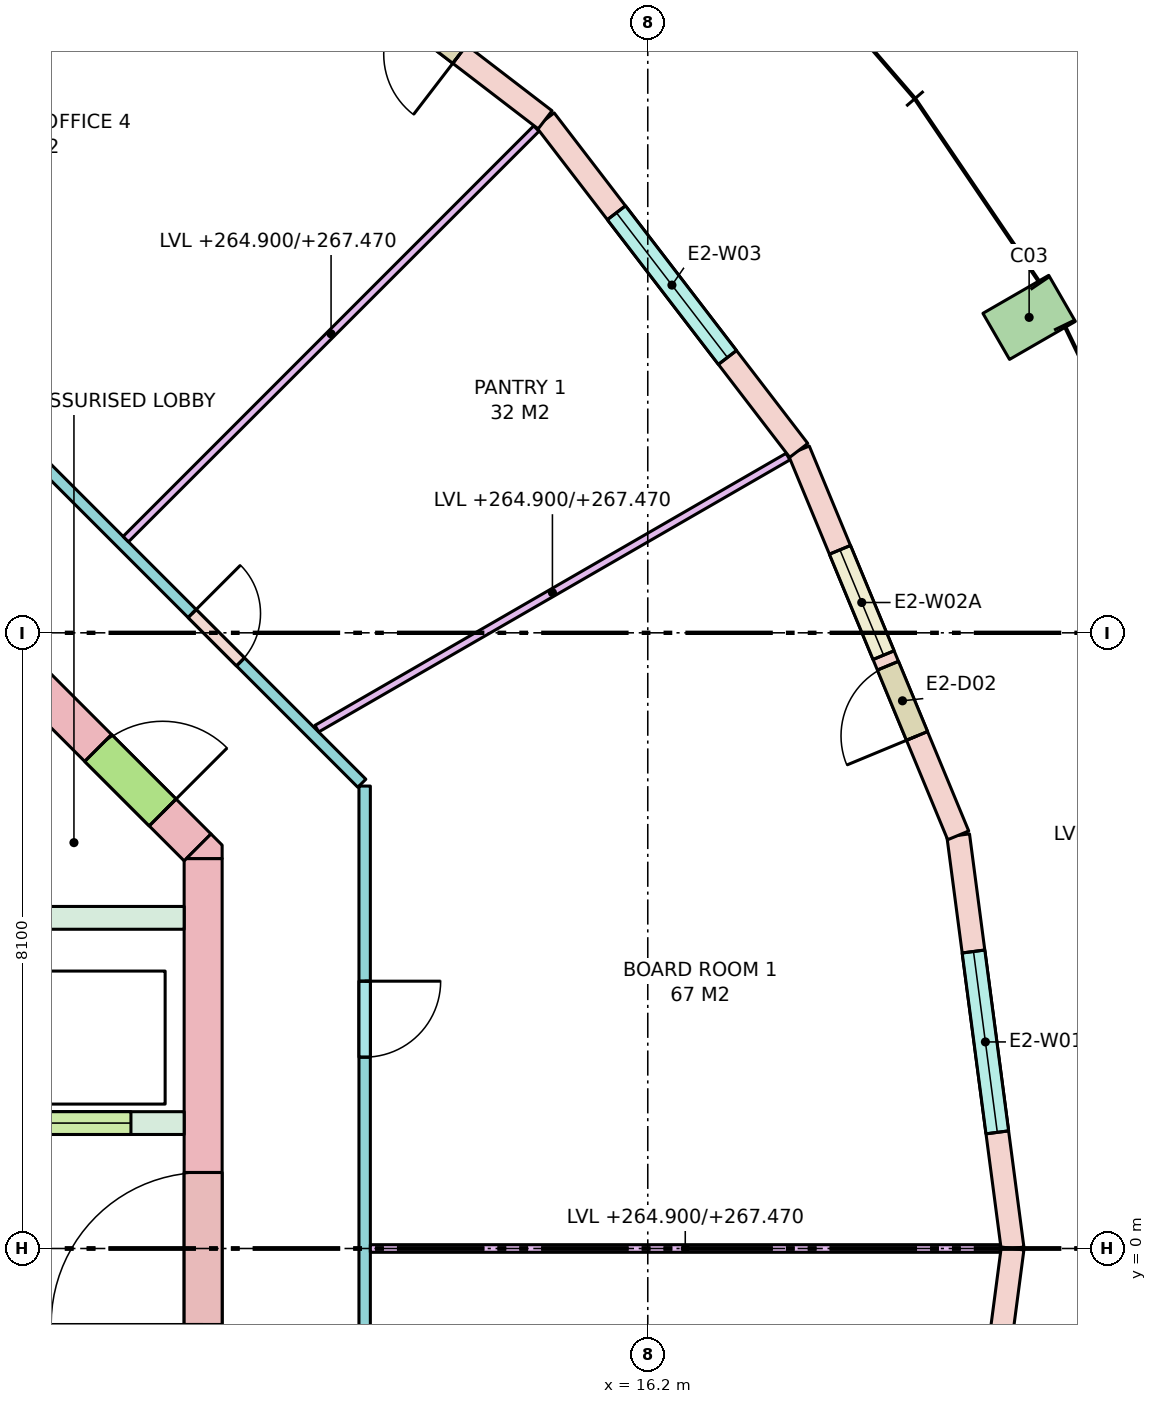
"""IFC4 building model, lengths in metres.
Left out: names, types, materials, properties, quantities, classifications, styles, units other than length and angle.
Written with IfcOpenShell. Run it as: python <this file> out.ifc"""

import sys

from ifc_helpers import new_model, si_unit, direction, frame, frame_2d, origin, origin_2d, place, context, subcontext, project, spatial, polyline, rectangle, outline, extrude, element, fill, save


model = new_model("IFC4")
c1 = context("Model", 3, precision=1e-05, world=origin(), true_north=direction((0.0, 1.0)))
c2 = subcontext(c1, "Body", "Model", "MODEL_VIEW")
j1 = project(units=[si_unit("LENGTHUNIT", "METRE"), si_unit("PLANEANGLEUNIT", "RADIAN")], contexts=[c1])
p1 = place(None, origin())
s1 = spatial("IfcSite", under=j1, at=p1, CompositionType="ELEMENT")
p2 = place(p1, origin())
s2 = spatial("IfcBuilding", under=s1, at=p2, CompositionType="ELEMENT")
p3 = place(p2, frame((0.0, 0.0, 264.9)))
s3 = spatial("IfcBuildingStorey", under=s2, at=p3, CompositionType="ELEMENT", Elevation=264.9)
p4 = place(p3, frame((21.218, 12.25, 0.0), z_axis=(0.0, 0.0, 1.0), x_axis=(-0.5, 0.866025403784, 0.0)))
e1 = element("IfcColumn", 1, at=p4, inside=s3, PredefinedType="COLUMN", context=c2, shape_type="SweptSolid", body=[
    extrude(rectangle(XDim=0.7, YDim=1.0, at=origin_2d()), origin(), (0.0, 0.0, 1.0), 3.7),
])
p5 = place(p3, frame((10.35, -5.13, -0.28), z_axis=(0.0, 0.0, 1.0), x_axis=(0.0, 1.0, 0.0)))
e2 = element("IfcWall", 2, at=p5, inside=s3, PredefinedType="SHEAR", context=c2, shape_type="SweptSolid", body=[
    extrude(rectangle(XDim=10.26, YDim=0.5, at=frame_2d((5.13, 0.0))), origin(), (0.0, 0.0, 1.0), 3.7),
])
p6 = place(p5, frame((4.13, 0.0, 0.28)))
e3 = element("IfcOpeningElement", 3, at=p6, cuts=e2, PredefinedType="OPENING", context=c2, shape_type="SweptSolid", body=[
    extrude(rectangle(XDim=2.0, YDim=2.1, at=frame_2d((1.0, 1.05))), frame((0.0, 0.26, 0.0), z_axis=(0.0, -1.0, 0.0), x_axis=(1.0, 0.0, 0.0)), (0.0, 0.0, 1.0), 0.52),
])
p7 = place(p3, frame((7.277, 8.277, -0.28), z_axis=(0.0, 0.0, 1.0), x_axis=(0.707106781187, -0.707106781187, 0.0)))
e4 = element("IfcWall", 4, at=p7, inside=s3, PredefinedType="SHEAR", context=c2, shape_type="SweptSolid", body=[
    extrude(rectangle(XDim=4.243, YDim=0.5, at=frame_2d((2.121, 0.0))), origin(), (0.0, 0.0, 1.0), 3.7),
])
p8 = place(p7, frame((2.393, 0.0, 0.28)))
e5 = element("IfcOpeningElement", 5, at=p8, cuts=e4, PredefinedType="OPENING", context=c2, shape_type="SweptSolid", body=[
    extrude(rectangle(XDim=1.2, YDim=2.1, at=frame_2d((0.6, 1.05))), frame((0.0, 0.26, 0.0), z_axis=(0.0, -1.0, 0.0), x_axis=(1.0, 0.0, 0.0)), (0.0, 0.0, 1.0), 0.52),
])
p9 = place(p3, frame((0.0, 0.0, -0.28)))
e6 = element("IfcWall", 6, at=p9, inside=s3, PredefinedType="SHEAR", context=c2, shape_type="SweptSolid", body=[
    extrude(outline(polyline([(10.6, 5.307), (10.6, 5.13), (10.13, 5.13), (10.454, 5.454), (10.6, 5.307)])), origin(), (0.0, 0.0, 1.0), 3.7),
])
p10 = place(p3, frame((2.0, 4.35, 0.0), z_axis=(0.0, 0.0, 1.0), x_axis=(1.0, 0.0, 0.0)))
e7 = element("IfcWall", 7, at=p10, inside=s3, PredefinedType="SOLIDWALL", context=c2, shape_type="SweptSolid", body=[
    extrude(rectangle(XDim=8.1, YDim=0.3, at=frame_2d((4.05, 0.0))), origin(), (0.0, 0.0, 1.0), 3.42),
])
p11 = place(p3, frame((2.0, 1.65, 0.0), z_axis=(0.0, 0.0, 1.0), x_axis=(1.0, 0.0, 0.0)))
e8 = element("IfcWall", 8, at=p11, inside=s3, PredefinedType="SOLIDWALL", context=c2, shape_type="SweptSolid", body=[
    extrude(rectangle(XDim=8.1, YDim=0.3, at=frame_2d((4.05, 0.0))), origin(), (0.0, 0.0, 1.0), 3.42),
])
p12 = place(p11, frame((0.85, 0.0, 0.0)))
e9 = element("IfcOpeningElement", 9, at=p12, cuts=e8, PredefinedType="OPENING", context=c2, shape_type="SweptSolid", body=[
    extrude(rectangle(XDim=1.1, YDim=2.1, at=frame_2d((0.55, 1.05))), frame((0.0, 0.16, 0.0), z_axis=(0.0, -1.0, 0.0), x_axis=(1.0, 0.0, 0.0)), (0.0, 0.0, 1.0), 0.32),
])
p13 = place(p11, frame((3.5, 0.0, 0.0)))
e10 = element("IfcOpeningElement", 10, at=p13, cuts=e8, PredefinedType="OPENING", context=c2, shape_type="SweptSolid", body=[
    extrude(rectangle(XDim=1.1, YDim=2.1, at=frame_2d((0.55, 1.05))), frame((0.0, 0.16, 0.0), z_axis=(0.0, -1.0, 0.0), x_axis=(1.0, 0.0, 0.0)), (0.0, 0.0, 1.0), 0.32),
])
p14 = place(p11, frame((6.3, 0.0, 0.0)))
e11 = element("IfcOpeningElement", 11, at=p14, cuts=e8, PredefinedType="OPENING", context=c2, shape_type="SweptSolid", body=[
    extrude(rectangle(XDim=1.1, YDim=2.1, at=frame_2d((0.55, 1.05))), frame((0.0, 0.16, 0.0), z_axis=(0.0, -1.0, 0.0), x_axis=(1.0, 0.0, 0.0)), (0.0, 0.0, 1.0), 0.32),
])
p15 = place(p3, frame((21.0, 0.0, 0.0), z_axis=(0.0, 0.0, 1.0), x_axis=(-0.130527087244, 0.991444743541, 0.0)))
e12 = element("IfcWall", 12, at=p15, inside=s3, PredefinedType="STANDARD", context=c2, shape_type="SweptSolid", body=[
    extrude(rectangle(XDim=5.482, YDim=0.3, at=frame_2d((2.741, 0.0))), origin(), (0.0, 0.0, 1.0), 3.42),
])
p16 = place(p15, frame((1.541, 0.0, 0.8)))
e13 = element("IfcOpeningElement", 13, at=p16, cuts=e12, PredefinedType="OPENING", context=c2, shape_type="SweptSolid", body=[
    extrude(rectangle(XDim=2.4, YDim=2.4, at=frame_2d((1.2, 1.2))), frame((0.0, 0.16, 0.0), z_axis=(0.0, -1.0, 0.0), x_axis=(1.0, 0.0, 0.0)), (0.0, 0.0, 1.0), 0.32),
])
p17 = place(p3, frame((20.284, 5.435, 0.0), z_axis=(0.0, 0.0, 1.0), x_axis=(-0.382688740813, 0.923877333662, 0.0)))
e14 = element("IfcWall", 14, at=p17, inside=s3, PredefinedType="STANDARD", context=c2, shape_type="SweptSolid", body=[
    extrude(rectangle(XDim=5.482, YDim=0.3, at=frame_2d((2.741, 0.0))), origin(), (0.0, 0.0, 1.0), 3.42),
])
p18 = place(p17, frame((1.416, 0.0, 0.0)))
e15 = element("IfcOpeningElement", 15, at=p18, cuts=e14, PredefinedType="OPENING", context=c2, shape_type="SweptSolid", body=[
    extrude(rectangle(XDim=1.0, YDim=2.4, at=frame_2d((0.5, 1.2))), frame((0.0, 0.16, 0.0), z_axis=(0.0, -1.0, 0.0), x_axis=(1.0, 0.0, 0.0)), (0.0, 0.0, 1.0), 0.32),
])
p19 = place(p17, frame((2.566, 0.0, 0.8)))
e16 = element("IfcOpeningElement", 16, at=p19, cuts=e14, PredefinedType="OPENING", context=c2, shape_type="SweptSolid", body=[
    extrude(rectangle(XDim=1.5, YDim=2.4, at=frame_2d((0.75, 1.2))), frame((0.0, 0.16, 0.0), z_axis=(0.0, -1.0, 0.0), x_axis=(1.0, 0.0, 0.0)), (0.0, 0.0, 1.0), 0.32),
])
p20 = place(p3, frame((18.187, 10.5, 0.0), z_axis=(0.0, 0.0, 1.0), x_axis=(-0.608784891166, 0.793335336593, 0.0)))
e17 = element("IfcWall", 17, at=p20, inside=s3, PredefinedType="STANDARD", context=c2, shape_type="SweptSolid", body=[
    extrude(rectangle(XDim=5.482, YDim=0.3, at=frame_2d((2.741, 0.0))), origin(), (0.0, 0.0, 1.0), 3.42),
])
p21 = place(p20, frame((1.541, 0.0, 0.8)))
e18 = element("IfcOpeningElement", 18, at=p21, cuts=e17, PredefinedType="OPENING", context=c2, shape_type="SweptSolid", body=[
    extrude(rectangle(XDim=2.4, YDim=2.4, at=frame_2d((1.2, 1.2))), frame((0.0, 0.16, 0.0), z_axis=(0.0, -1.0, 0.0), x_axis=(1.0, 0.0, 0.0)), (0.0, 0.0, 1.0), 0.32),
])
p22 = place(p3, frame((14.849, 14.849, 0.0), z_axis=(0.0, 0.0, 1.0), x_axis=(-0.793335336593, 0.608784891166, 0.0)))
e19 = element("IfcWall", 19, at=p22, inside=s3, PredefinedType="STANDARD", context=c2, shape_type="SweptSolid", body=[
    extrude(rectangle(XDim=5.482, YDim=0.3, at=frame_2d((2.741, 0.0))), origin(), (0.0, 0.0, 1.0), 3.42),
])
p23 = place(p22, frame((1.416, 0.0, 0.0)))
e20 = element("IfcOpeningElement", 20, at=p23, cuts=e19, PredefinedType="OPENING", context=c2, shape_type="SweptSolid", body=[
    extrude(rectangle(XDim=1.0, YDim=2.4, at=frame_2d((0.5, 1.2))), frame((0.0, 0.16, 0.0), z_axis=(0.0, -1.0, 0.0), x_axis=(1.0, 0.0, 0.0)), (0.0, 0.0, 1.0), 0.32),
])
p24 = place(p22, frame((2.566, 0.0, 0.8)))
e21 = element("IfcOpeningElement", 21, at=p24, cuts=e19, PredefinedType="OPENING", context=c2, shape_type="SweptSolid", body=[
    extrude(rectangle(XDim=1.5, YDim=2.4, at=frame_2d((0.75, 1.2))), frame((0.0, 0.16, 0.0), z_axis=(0.0, -1.0, 0.0), x_axis=(1.0, 0.0, 0.0)), (0.0, 0.0, 1.0), 0.32),
])
p25 = place(p3, frame((20.284, -5.435, 0.0), z_axis=(0.0, 0.0, 1.0), x_axis=(0.130527087244, 0.991444743541, 0.0)))
e22 = element("IfcWall", 22, at=p25, inside=s3, PredefinedType="STANDARD", context=c2, shape_type="SweptSolid", body=[
    extrude(rectangle(XDim=5.482, YDim=0.3, at=frame_2d((2.741, 0.0))), origin(), (0.0, 0.0, 1.0), 3.42),
])
p26 = place(p25, frame((1.416, 0.0, 0.0)))
e23 = element("IfcOpeningElement", 23, at=p26, cuts=e22, PredefinedType="OPENING", context=c2, shape_type="SweptSolid", body=[
    extrude(rectangle(XDim=1.0, YDim=2.4, at=frame_2d((0.5, 1.2))), frame((0.0, 0.16, 0.0), z_axis=(0.0, -1.0, 0.0), x_axis=(1.0, 0.0, 0.0)), (0.0, 0.0, 1.0), 0.32),
])
p27 = place(p25, frame((2.566, 0.0, 0.8)))
e24 = element("IfcOpeningElement", 24, at=p27, cuts=e22, PredefinedType="OPENING", context=c2, shape_type="SweptSolid", body=[
    extrude(rectangle(XDim=1.5, YDim=2.4, at=frame_2d((0.75, 1.2))), frame((0.0, 0.16, 0.0), z_axis=(0.0, -1.0, 0.0), x_axis=(1.0, 0.0, 0.0)), (0.0, 0.0, 1.0), 0.32),
])
p28 = place(p3, frame((8.121, 10.438, 0.0), z_axis=(0.0, 0.0, 1.0), x_axis=(0.707106781187, -0.707106781187, 0.0)))
e25 = element("IfcWall", 25, at=p28, inside=s3, PredefinedType="PARTITIONING", context=c2, shape_type="SweptSolid", body=[
    extrude(rectangle(XDim=6.105, YDim=0.15, at=frame_2d((3.053, 0.0))), origin(), (0.0, 0.0, 1.0), 2.57),
])
p29 = place(p28, frame((2.948, 0.0, 0.0)))
e26 = element("IfcOpeningElement", 26, at=p29, cuts=e25, PredefinedType="OPENING", context=c2, shape_type="SweptSolid", body=[
    extrude(rectangle(XDim=0.9, YDim=2.1, at=frame_2d((0.45, 1.05))), frame((0.0, 0.085, 0.0), z_axis=(0.0, -1.0, 0.0), x_axis=(1.0, 0.0, 0.0)), (0.0, 0.0, 1.0), 0.17),
])
p30 = place(p3, frame((12.475, 6.084, 0.0), z_axis=(0.0, 0.0, 1.0), x_axis=(0.0, -1.0, 0.0)))
e27 = element("IfcWall", 27, at=p30, inside=s3, PredefinedType="PARTITIONING", context=c2, shape_type="SweptSolid", body=[
    extrude(rectangle(XDim=12.167, YDim=0.15, at=frame_2d((6.084, 0.0))), origin(), (0.0, 0.0, 1.0), 2.57),
])
p31 = place(p30, frame((7.306, 0.0, 0.0)))
e28 = element("IfcOpeningElement", 28, at=p31, cuts=e27, PredefinedType="OPENING", context=c2, shape_type="SweptSolid", body=[
    extrude(rectangle(XDim=0.9, YDim=2.1, at=frame_2d((0.45, 1.05))), frame((0.0, 0.085, 0.0), z_axis=(0.0, -1.0, 0.0), x_axis=(1.0, 0.0, 0.0)), (0.0, 0.0, 1.0), 0.17),
])
p32 = place(p30, frame((2.567, 0.0, 0.0)))
e29 = element("IfcOpeningElement", 29, at=p32, cuts=e27, PredefinedType="OPENING", context=c2, shape_type="SweptSolid", body=[
    extrude(rectangle(XDim=1.0, YDim=2.1, at=frame_2d((0.5, 1.05))), frame((0.0, 0.085, 0.0), z_axis=(0.0, -1.0, 0.0), x_axis=(1.0, 0.0, 0.0)), (0.0, 0.0, 1.0), 0.17),
])
p33 = place(p3, frame((12.55, 0.0, 0.0), z_axis=(0.0, 0.0, 1.0), x_axis=(1.0, 0.0, 0.0)))
e30 = element("IfcWall", 30, at=p33, inside=s3, PredefinedType="PARTITIONING", context=c2, shape_type="SweptSolid", body=[
    extrude(rectangle(XDim=8.287, YDim=0.1, at=frame_2d((4.143, 0.0))), origin(), (0.0, 0.0, 1.0), 2.57),
])
p34 = place(p3, frame((11.846, 6.839, 0.0), z_axis=(0.0, 0.0, 1.0), x_axis=(0.866011787705, 0.500023583, 0.0)))
e31 = element("IfcWall", 31, at=p34, inside=s3, PredefinedType="PARTITIONING", context=c2, shape_type="SweptSolid", body=[
    extrude(rectangle(XDim=7.158, YDim=0.1, at=frame_2d((3.579, 0.0))), origin(), (0.0, 0.0, 1.0), 2.57),
])
p35 = place(p3, frame((9.333, 9.333, 0.0), z_axis=(0.0, 0.0, 1.0), x_axis=(0.707106781187, 0.707106781187, 0.0)))
e32 = element("IfcWall", 32, at=p35, inside=s3, PredefinedType="PARTITIONING", context=c2, shape_type="SweptSolid", body=[
    extrude(rectangle(XDim=7.639, YDim=0.1, at=frame_2d((3.819, 0.0))), origin(), (0.0, 0.0, 1.0), 2.57),
])
p36 = place(p16, origin())
e33 = element("IfcWindow", 33, at=p36, inside=s3, PartitioningType="SINGLE_PANEL", PredefinedType="WINDOW", context=c2, shape_type="SweptSolid", body=[
    extrude(rectangle(XDim=2.4, YDim=2.4, at=frame_2d((1.2, 1.2))), frame((0.0, 0.03, 0.0), z_axis=(0.0, -1.0, 0.0), x_axis=(1.0, 0.0, 0.0)), (0.0, 0.0, 1.0), 0.06),
])
fill(e13, e33)
p37 = place(p18, origin())
e34 = element("IfcDoor", 34, at=p37, inside=s3, OperationType="SINGLE_SWING_LEFT", PredefinedType="DOOR", context=c2, shape_type="SweptSolid", body=[
    extrude(rectangle(XDim=1.0, YDim=2.4, at=frame_2d((0.5, 1.2))), frame((0.0, 0.025, 0.0), z_axis=(0.0, -1.0, 0.0), x_axis=(1.0, 0.0, 0.0)), (0.0, 0.0, 1.0), 0.05),
])
fill(e15, e34)
p38 = place(p19, origin())
e35 = element("IfcWindow", 35, at=p38, inside=s3, PartitioningType="SINGLE_PANEL", PredefinedType="WINDOW", context=c2, shape_type="SweptSolid", body=[
    extrude(rectangle(XDim=1.5, YDim=2.4, at=frame_2d((0.75, 1.2))), frame((0.0, 0.03, 0.0), z_axis=(0.0, -1.0, 0.0), x_axis=(1.0, 0.0, 0.0)), (0.0, 0.0, 1.0), 0.06),
])
fill(e16, e35)
p39 = place(p21, origin())
e36 = element("IfcWindow", 36, at=p39, inside=s3, PartitioningType="SINGLE_PANEL", PredefinedType="WINDOW", context=c2, shape_type="SweptSolid", body=[
    extrude(rectangle(XDim=2.4, YDim=2.4, at=frame_2d((1.2, 1.2))), frame((0.0, 0.03, 0.0), z_axis=(0.0, -1.0, 0.0), x_axis=(1.0, 0.0, 0.0)), (0.0, 0.0, 1.0), 0.06),
])
fill(e18, e36)
p40 = place(p23, origin())
e37 = element("IfcDoor", 37, at=p40, inside=s3, OperationType="SINGLE_SWING_LEFT", PredefinedType="DOOR", context=c2, shape_type="SweptSolid", body=[
    extrude(rectangle(XDim=1.0, YDim=2.4, at=frame_2d((0.5, 1.2))), frame((0.0, 0.025, 0.0), z_axis=(0.0, -1.0, 0.0), x_axis=(1.0, 0.0, 0.0)), (0.0, 0.0, 1.0), 0.05),
])
fill(e20, e37)
p41 = place(p14, origin())
e38 = element("IfcDoor", 38, at=p41, inside=s3, OperationType="DOUBLE_DOOR_SLIDING", PredefinedType="DOOR", context=c2, shape_type="SweptSolid", body=[
    extrude(rectangle(XDim=1.1, YDim=2.1, at=frame_2d((0.55, 1.05))), frame((0.0, 0.025, 0.0), z_axis=(0.0, -1.0, 0.0), x_axis=(1.0, 0.0, 0.0)), (0.0, 0.0, 1.0), 0.05),
])
fill(e11, e38)
p42 = place(p8, origin())
e39 = element("IfcDoor", 39, at=p42, inside=s3, OperationType="SINGLE_SWING_RIGHT", PredefinedType="DOOR", context=c2, shape_type="SweptSolid", body=[
    extrude(rectangle(XDim=1.2, YDim=2.1, at=frame_2d((0.6, 1.05))), frame((0.0, 0.025, 0.0), z_axis=(0.0, -1.0, 0.0), x_axis=(1.0, 0.0, 0.0)), (0.0, 0.0, 1.0), 0.05),
])
fill(e5, e39)
p43 = place(p6, origin())
e40 = element("IfcDoor", 40, at=p43, inside=s3, OperationType="DOUBLE_DOOR_SINGLE_SWING", PredefinedType="DOOR", context=c2, shape_type="SweptSolid", body=[
    extrude(rectangle(XDim=2.0, YDim=2.1, at=frame_2d((1.0, 1.05))), frame((0.0, 0.025, 0.0), z_axis=(0.0, -1.0, 0.0), x_axis=(1.0, 0.0, 0.0)), (0.0, 0.0, 1.0), 0.05),
])
fill(e3, e40)
p44 = place(p32, origin())
e41 = element("IfcDoor", 41, at=p44, inside=s3, OperationType="SINGLE_SWING_LEFT", PredefinedType="DOOR", context=c2, shape_type="SweptSolid", body=[
    extrude(rectangle(XDim=1.0, YDim=2.1, at=frame_2d((0.5, 1.05))), frame((0.0, 0.025, 0.0), z_axis=(0.0, -1.0, 0.0), x_axis=(1.0, 0.0, 0.0)), (0.0, 0.0, 1.0), 0.05),
])
fill(e29, e41)
p45 = place(p29, origin())
e42 = element("IfcDoor", 42, at=p45, inside=s3, OperationType="SINGLE_SWING_LEFT", PredefinedType="DOOR", context=c2, shape_type="SweptSolid", body=[
    extrude(rectangle(XDim=0.9, YDim=2.1, at=frame_2d((0.45, 1.05))), frame((0.0, 0.025, 0.0), z_axis=(0.0, -1.0, 0.0), x_axis=(1.0, 0.0, 0.0)), (0.0, 0.0, 1.0), 0.05),
])
fill(e26, e42)
save(model, sys.argv[1])
